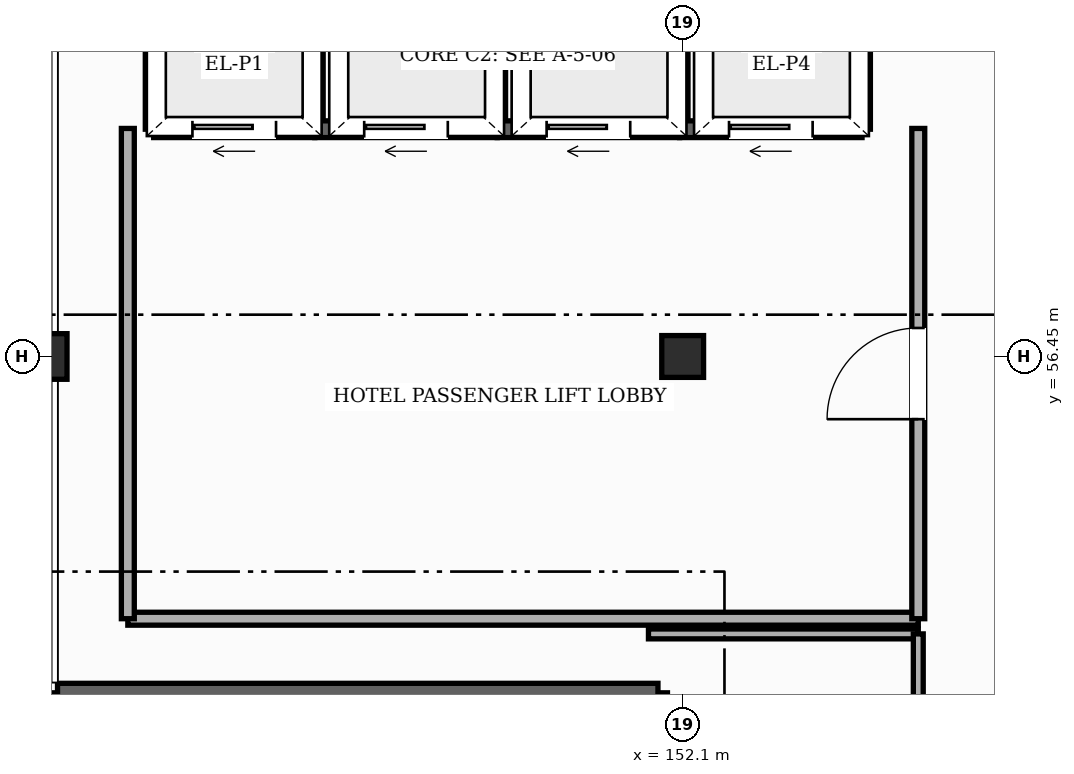
"""IFC4 building model, lengths in metres.
Left out: names, types, materials, properties, quantities, classifications, styles, units other than length and angle.
Written with IfcOpenShell. Run it as: python <this file> out.ifc"""

import sys

from ifc_helpers import new_model, si_unit, direction, frame, frame_2d, origin, origin_2d, place, context, subcontext, project, spatial, rectangle, hollow_rectangle, extrude, element, fill, save


model = new_model("IFC4")
c1 = context("Model", 3, precision=1e-05, world=origin(), true_north=direction((0.0, 1.0)))
c2 = subcontext(c1, "Body", "Model", "MODEL_VIEW")
j1 = project(units=[si_unit("LENGTHUNIT", "METRE"), si_unit("PLANEANGLEUNIT", "RADIAN")], contexts=[c1])
p1 = place(None, origin())
s1 = spatial("IfcSite", under=j1, at=p1, CompositionType="ELEMENT")
p2 = place(p1, origin())
s2 = spatial("IfcBuilding", under=s1, at=p2, CompositionType="ELEMENT")
p3 = place(p2, frame((0.0, 0.0, 28.2)))
s3 = spatial("IfcBuildingStorey", under=s2, at=p3, CompositionType="ELEMENT", Elevation=28.2)
p4 = place(p3, frame((143.7, 56.45, 0.0), z_axis=(0.0, 0.0, 1.0), x_axis=(1.0, 0.0, 0.0)))
e1 = element("IfcColumn", 1, at=p4, inside=s3, PredefinedType="COLUMN", context=c2, shape_type="SweptSolid", body=[
    extrude(hollow_rectangle(XDim=0.6, YDim=0.6, WallThickness=0.025, InnerFilletRadius=0.025, OuterFilletRadius=0.05, at=origin_2d()), origin(), (0.0, 0.0, 1.0), 3.6),
])
p5 = place(p3, frame((152.1, 56.45, 0.0), z_axis=(0.0, 0.0, 1.0), x_axis=(1.0, 0.0, 0.0)))
e2 = element("IfcColumn", 2, at=p5, inside=s3, PredefinedType="COLUMN", context=c2, shape_type="SweptSolid", body=[
    extrude(hollow_rectangle(XDim=0.55, YDim=0.55, WallThickness=0.022, InnerFilletRadius=0.022, OuterFilletRadius=0.044, at=origin_2d()), origin(), (0.0, 0.0, 1.0), 3.6),
])
for number, where, z_axis, x_axis in (
    (3, (143.875, 48.675, 0.0), (0.0, 0.0, 1.0), (0.0, 1.0, 0.0)),
    (4, (151.775, 52.025, 0.0), (0.0, 0.0, 1.0), (0.0, -1.0, 0.0)),
):
    element("IfcWall", number, at=place(p3, frame(where, z_axis=z_axis, x_axis=x_axis)), inside=s3, PredefinedType="SHEAR", context=c2, shape_type="SweptSolid", body=[
        extrude(rectangle(XDim=3.35, YDim=0.25, at=frame_2d((1.675, 0.0))), origin(), (0.0, 0.0, 1.0), 3.38),
    ])
p6 = place(p3, frame((143.875, 52.025, 0.0), z_axis=(0.0, 0.0, 1.0), x_axis=(1.0, 0.0, 0.0)))
e5 = element("IfcWall", 5, at=p6, inside=s3, PredefinedType="SHEAR", context=c2, shape_type="SweptSolid", body=[
    extrude(rectangle(XDim=7.9, YDim=0.25, at=frame_2d((3.95, 0.0))), origin(), (0.0, 0.0, 1.0), 3.38),
])
p7 = place(p3, frame((145.14, 59.44, 0.0), z_axis=(0.0, 0.0, 1.0), x_axis=(1.0, 0.0, 0.0)))
e6 = element("IfcWall", 6, at=p7, inside=s3, PredefinedType="SHEAR", context=c2, shape_type="SweptSolid", body=[
    extrude(rectangle(XDim=2.12, YDim=0.22, at=frame_2d((1.06, 0.0))), origin(), (0.0, 0.0, 1.0), 3.38),
])
p8 = place(p7, frame((0.51, 0.0, 0.0)))
e7 = element("IfcOpeningElement", 7, at=p8, cuts=e6, PredefinedType="OPENING", context=c2, shape_type="SweptSolid", body=[
    extrude(rectangle(XDim=1.1, YDim=2.2, at=frame_2d((0.55, 1.1))), frame((0.0, 0.12, 0.0), z_axis=(0.0, -1.0, 0.0), x_axis=(1.0, 0.0, 0.0)), (0.0, 0.0, 1.0), 0.24),
])
for number, where, z_axis, x_axis in (
    (8, (147.26, 59.44, 0.0), (0.0, 0.0, 1.0), (0.0, 1.0, 0.0)),
    (9, (145.14, 59.44, 0.0), (0.0, 0.0, 1.0), (0.0, 1.0, 0.0)),
):
    element("IfcWall", number, at=place(p3, frame(where, z_axis=z_axis, x_axis=x_axis)), inside=s3, PredefinedType="SHEAR", context=c2, shape_type="SweptSolid", body=[
        extrude(rectangle(XDim=1.92, YDim=0.22, at=frame_2d((0.96, 0.0))), origin(), (0.0, 0.0, 1.0), 3.38),
    ])
p9 = place(p3, frame((147.26, 59.44, 0.0), z_axis=(0.0, 0.0, 1.0), x_axis=(1.0, 0.0, 0.0)))
e10 = element("IfcWall", 10, at=p9, inside=s3, PredefinedType="SHEAR", context=c2, shape_type="SweptSolid", body=[
    extrude(rectangle(XDim=2.4, YDim=0.22, at=frame_2d((1.2, 0.0))), origin(), (0.0, 0.0, 1.0), 3.38),
])
p10 = place(p9, frame((0.65, 0.0, 0.0)))
e11 = element("IfcOpeningElement", 11, at=p10, cuts=e10, PredefinedType="OPENING", context=c2, shape_type="SweptSolid", body=[
    extrude(rectangle(XDim=1.1, YDim=2.2, at=frame_2d((0.55, 1.1))), frame((0.0, 0.12, 0.0), z_axis=(0.0, -1.0, 0.0), x_axis=(1.0, 0.0, 0.0)), (0.0, 0.0, 1.0), 0.24),
])
p11 = place(p3, frame((149.66, 59.44, 0.0), z_axis=(0.0, 0.0, 1.0), x_axis=(0.0, 1.0, 0.0)))
e12 = element("IfcWall", 12, at=p11, inside=s3, PredefinedType="SHEAR", context=c2, shape_type="SweptSolid", body=[
    extrude(rectangle(XDim=1.92, YDim=0.22, at=frame_2d((0.96, 0.0))), origin(), (0.0, 0.0, 1.0), 3.38),
])
p12 = place(p3, frame((149.66, 59.44, 0.0), z_axis=(0.0, 0.0, 1.0), x_axis=(1.0, 0.0, 0.0)))
e13 = element("IfcWall", 13, at=p12, inside=s3, PredefinedType="SHEAR", context=c2, shape_type="SweptSolid", body=[
    extrude(rectangle(XDim=2.4, YDim=0.22, at=frame_2d((1.2, 0.0))), origin(), (0.0, 0.0, 1.0), 3.38),
])
p13 = place(p12, frame((0.65, 0.0, 0.0)))
e14 = element("IfcOpeningElement", 14, at=p13, cuts=e13, PredefinedType="OPENING", context=c2, shape_type="SweptSolid", body=[
    extrude(rectangle(XDim=1.1, YDim=2.2, at=frame_2d((0.55, 1.1))), frame((0.0, 0.12, 0.0), z_axis=(0.0, -1.0, 0.0), x_axis=(1.0, 0.0, 0.0)), (0.0, 0.0, 1.0), 0.24),
])
p14 = place(p3, frame((152.06, 59.44, 0.0), z_axis=(0.0, 0.0, 1.0), x_axis=(0.0, 1.0, 0.0)))
e15 = element("IfcWall", 15, at=p14, inside=s3, PredefinedType="SHEAR", context=c2, shape_type="SweptSolid", body=[
    extrude(rectangle(XDim=1.92, YDim=0.22, at=frame_2d((0.96, 0.0))), origin(), (0.0, 0.0, 1.0), 3.38),
])
p15 = place(p3, frame((152.06, 59.44, 0.0), z_axis=(0.0, 0.0, 1.0), x_axis=(1.0, 0.0, 0.0)))
e16 = element("IfcWall", 16, at=p15, inside=s3, PredefinedType="SHEAR", context=c2, shape_type="SweptSolid", body=[
    extrude(rectangle(XDim=2.4, YDim=0.22, at=frame_2d((1.2, 0.0))), origin(), (0.0, 0.0, 1.0), 3.38),
])
p16 = place(p15, frame((0.65, 0.0, 0.0)))
e17 = element("IfcOpeningElement", 17, at=p16, cuts=e16, PredefinedType="OPENING", context=c2, shape_type="SweptSolid", body=[
    extrude(rectangle(XDim=1.1, YDim=2.2, at=frame_2d((0.55, 1.1))), frame((0.0, 0.12, 0.0), z_axis=(0.0, -1.0, 0.0), x_axis=(1.0, 0.0, 0.0)), (0.0, 0.0, 1.0), 0.24),
])
p17 = place(p3, frame((154.46, 59.44, 0.0), z_axis=(0.0, 0.0, 1.0), x_axis=(0.0, 1.0, 0.0)))
e18 = element("IfcWall", 18, at=p17, inside=s3, PredefinedType="SHEAR", context=c2, shape_type="SweptSolid", body=[
    extrude(rectangle(XDim=1.92, YDim=0.22, at=frame_2d((0.96, 0.0))), origin(), (0.0, 0.0, 1.0), 3.38),
])
p18 = place(p3, frame((151.65, 52.8, 0.0), z_axis=(0.0, 0.0, 1.0), x_axis=(1.0, 0.0, 0.0)))
e19 = element("IfcWall", 19, at=p18, inside=s3, PredefinedType="PARTITIONING", context=c2, shape_type="SweptSolid", body=[
    extrude(rectangle(XDim=3.55, YDim=0.13, at=frame_2d((1.775, 0.0))), origin(), (0.0, 0.0, 1.0), 3.365),
])
p19 = place(p3, frame((144.8, 53.0, 0.0), z_axis=(0.0, 0.0, 1.0), x_axis=(1.0, 0.0, 0.0)))
e20 = element("IfcWall", 20, at=p19, inside=s3, PredefinedType="PARTITIONING", context=c2, shape_type="SweptSolid", body=[
    extrude(rectangle(XDim=10.4, YDim=0.17, at=frame_2d((5.2, 0.0))), origin(), (0.0, 0.0, 1.0), 3.365),
])
p20 = place(p3, frame((144.8, 53.0, 0.0), z_axis=(0.0, 0.0, 1.0), x_axis=(0.0, 1.0, 0.0)))
e21 = element("IfcWall", 21, at=p20, inside=s3, PredefinedType="PARTITIONING", context=c2, shape_type="SweptSolid", body=[
    extrude(rectangle(XDim=6.45, YDim=0.17, at=frame_2d((3.225, 0.0))), origin(), (0.0, 0.0, 1.0), 3.365),
])
p21 = place(p3, frame((155.2, 48.8, 0.0), z_axis=(0.0, 0.0, 1.0), x_axis=(0.0, 1.0, 0.0)))
e22 = element("IfcWall", 22, at=p21, inside=s3, PredefinedType="PARTITIONING", context=c2, shape_type="SweptSolid", body=[
    extrude(rectangle(XDim=4.0, YDim=0.13, at=frame_2d((2.0, 0.0))), origin(), (0.0, 0.0, 1.0), 3.365),
])
p22 = place(p21, frame((1.5, 0.0, 0.0)))
e23 = element("IfcOpeningElement", 23, at=p22, cuts=e22, PredefinedType="OPENING", context=c2, shape_type="SweptSolid", body=[
    extrude(rectangle(XDim=1.0, YDim=2.18, at=frame_2d((0.5, 1.09))), frame((0.0, 0.075, 0.0), z_axis=(0.0, -1.0, 0.0), x_axis=(1.0, 0.0, 0.0)), (0.0, 0.0, 1.0), 0.15),
])
p23 = place(p3, frame((155.2, 53.0, 0.0), z_axis=(0.0, 0.0, 1.0), x_axis=(0.0, 1.0, 0.0)))
e24 = element("IfcWall", 24, at=p23, inside=s3, PredefinedType="PARTITIONING", context=c2, shape_type="SweptSolid", body=[
    extrude(rectangle(XDim=6.45, YDim=0.17, at=frame_2d((3.225, 0.0))), origin(), (0.0, 0.0, 1.0), 3.365),
])
p24 = place(p23, frame((2.625, 0.0, 0.0)))
e25 = element("IfcOpeningElement", 25, at=p24, cuts=e24, PredefinedType="OPENING", context=c2, shape_type="SweptSolid", body=[
    extrude(rectangle(XDim=1.2, YDim=2.2, at=frame_2d((0.6, 1.1))), frame((0.0, 0.095, 0.0), z_axis=(0.0, -1.0, 0.0), x_axis=(1.0, 0.0, 0.0)), (0.0, 0.0, 1.0), 0.19),
])
p25 = place(p8, origin())
e26 = element("IfcDoor", 26, at=p25, inside=s3, OperationType="SLIDING_TO_LEFT", PredefinedType="DOOR", context=c2, shape_type="SweptSolid", body=[
    extrude(rectangle(XDim=1.1, YDim=2.2, at=frame_2d((0.55, 1.1))), frame((0.0, 0.025, 0.0), z_axis=(0.0, -1.0, 0.0), x_axis=(1.0, 0.0, 0.0)), (0.0, 0.0, 1.0), 0.05),
])
fill(e7, e26)
p26 = place(p10, origin())
e27 = element("IfcDoor", 27, at=p26, inside=s3, OperationType="SLIDING_TO_LEFT", PredefinedType="DOOR", context=c2, shape_type="SweptSolid", body=[
    extrude(rectangle(XDim=1.1, YDim=2.2, at=frame_2d((0.55, 1.1))), frame((0.0, 0.025, 0.0), z_axis=(0.0, -1.0, 0.0), x_axis=(1.0, 0.0, 0.0)), (0.0, 0.0, 1.0), 0.05),
])
fill(e11, e27)
p27 = place(p13, origin())
e28 = element("IfcDoor", 28, at=p27, inside=s3, OperationType="SLIDING_TO_LEFT", PredefinedType="DOOR", context=c2, shape_type="SweptSolid", body=[
    extrude(rectangle(XDim=1.1, YDim=2.2, at=frame_2d((0.55, 1.1))), frame((0.0, 0.025, 0.0), z_axis=(0.0, -1.0, 0.0), x_axis=(1.0, 0.0, 0.0)), (0.0, 0.0, 1.0), 0.05),
])
fill(e14, e28)
p28 = place(p16, origin())
e29 = element("IfcDoor", 29, at=p28, inside=s3, OperationType="SLIDING_TO_LEFT", PredefinedType="DOOR", context=c2, shape_type="SweptSolid", body=[
    extrude(rectangle(XDim=1.1, YDim=2.2, at=frame_2d((0.55, 1.1))), frame((0.0, 0.025, 0.0), z_axis=(0.0, -1.0, 0.0), x_axis=(1.0, 0.0, 0.0)), (0.0, 0.0, 1.0), 0.05),
])
fill(e17, e29)
p29 = place(p24, origin())
e30 = element("IfcDoor", 30, at=p29, inside=s3, OperationType="SINGLE_SWING_LEFT", PredefinedType="DOOR", context=c2, shape_type="SweptSolid", body=[
    extrude(rectangle(XDim=1.2, YDim=2.2, at=frame_2d((0.6, 1.1))), frame((0.0, 0.025, 0.0), z_axis=(0.0, -1.0, 0.0), x_axis=(1.0, 0.0, 0.0)), (0.0, 0.0, 1.0), 0.05),
])
fill(e25, e30)
save(model, sys.argv[1])
